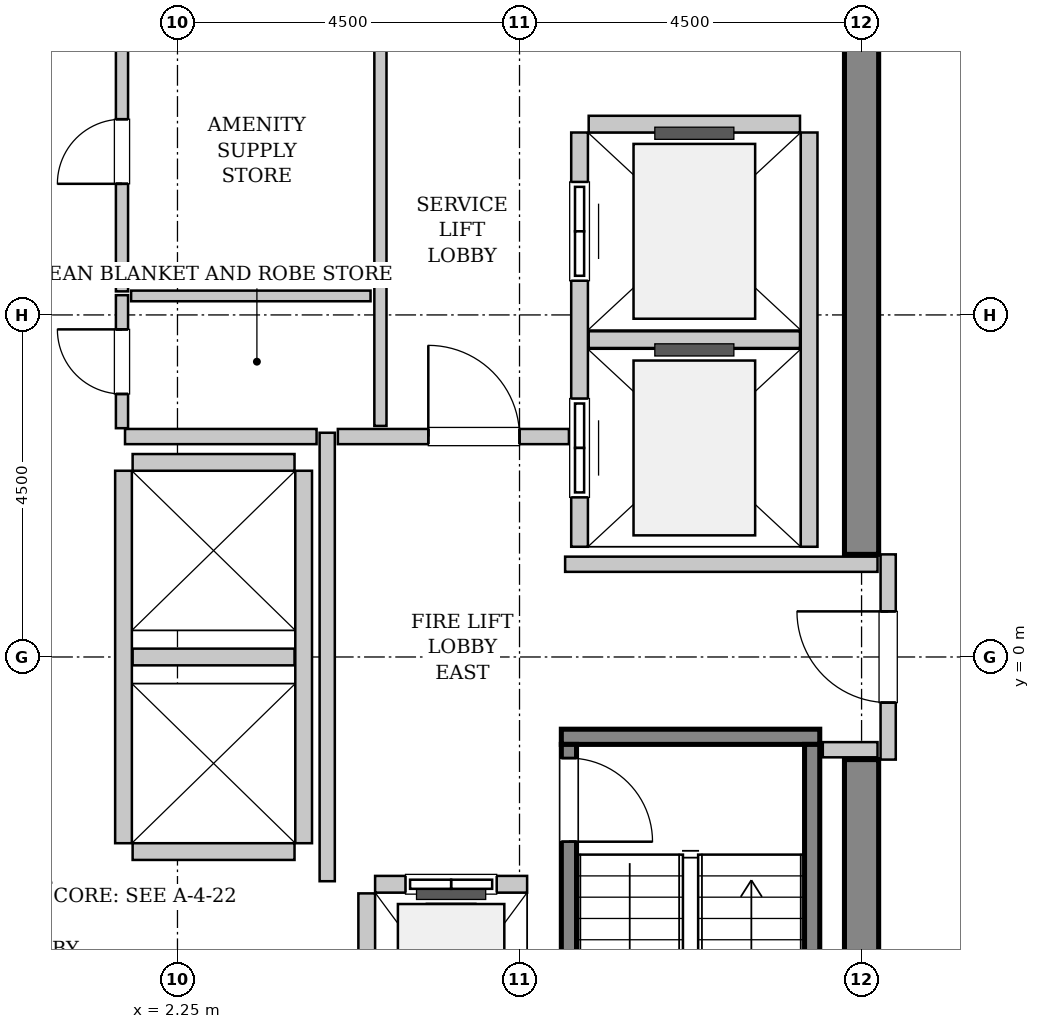
"""IFC4 building model, lengths in metres.
Left out: names, types, materials, properties, quantities, classifications, styles, units other than length and angle.
Written with IfcOpenShell. Run it as: python <this file> out.ifc"""

import sys

from ifc_helpers import new_model, si_unit, direction, frame, frame_2d, origin, place, context, subcontext, project, spatial, rectangle, extrude, source, transform, mapped, element, fill, save


model = new_model("IFC4")
c1 = context("Model", 3, precision=1e-05, world=origin(), true_north=direction((0.0, 1.0)))
c2 = subcontext(c1, "Body", "Model", "MODEL_VIEW")
j1 = project(units=[si_unit("LENGTHUNIT", "METRE"), si_unit("PLANEANGLEUNIT", "RADIAN")], contexts=[c1])
p1 = place(None, origin())
s1 = spatial("IfcSite", under=j1, at=p1, CompositionType="ELEMENT")
p2 = place(p1, origin())
s2 = spatial("IfcBuilding", under=s1, at=p2, CompositionType="ELEMENT")
p3 = place(p2, frame((0.0, 0.0, 268.4)))
s3 = spatial("IfcBuildingStorey", under=s2, at=p3, CompositionType="ELEMENT", Elevation=268.4)
m1 = source(origin(), c2, "Body", "SweptSolid", [
    extrude(rectangle(XDim=7.425, YDim=0.45, at=frame_2d((3.712, 0.0))), origin(), (0.0, 0.0, 1.0), 3.8),
])
for number, where, z_axis, x_axis in (
    (1, (11.25, -8.775, 0.0), (0.0, 0.0, 1.0), (0.0, 1.0, 0.0)),
    (2, (11.25, 1.35, 0.0), (0.0, 0.0, 1.0), (0.0, 1.0, 0.0)),
):
    element("IfcWall", number, at=place(p3, frame(where, z_axis=z_axis, x_axis=x_axis)), inside=s3, PredefinedType="SHEAR", context=c2, shape_type="MappedRepresentation", body=[
        mapped(m1, transform((0.0, 0.0, 0.0), x_axis=(1.0, 0.0, 0.0), y_axis=(0.0, 1.0, 0.0), z_axis=(0.0, 0.0, 1.0), scale=1.0)),
    ])
m2 = source(origin(), c2, "Body", "SweptSolid", [
    extrude(rectangle(XDim=3.4, YDim=0.2, at=frame_2d((1.7, 0.0))), origin(), (0.0, 0.0, 1.0), 3.8),
])
p4 = place(p3, frame((7.3, -1.05, 0.0), z_axis=(0.0, 0.0, 1.0), x_axis=(1.0, 0.0, 0.0)))
e3 = element("IfcWall", 3, at=p4, inside=s3, PredefinedType="SOLIDWALL", context=c2, shape_type="MappedRepresentation", body=[
    mapped(m2, transform((0.0, 0.0, 0.0), x_axis=(1.0, 0.0, 0.0), y_axis=(0.0, 1.0, 0.0), z_axis=(0.0, 0.0, 1.0), scale=1.0)),
])
m3 = source(origin(), c2, "Body", "SweptSolid", [
    extrude(rectangle(XDim=7.1, YDim=0.2, at=frame_2d((3.55, 0.0))), origin(), (0.0, 0.0, 1.0), 3.8),
])
p5 = place(p3, frame((7.4, -1.15, 0.0), z_axis=(0.0, 0.0, 1.0), x_axis=(0.0, -1.0, 0.0)))
e4 = element("IfcWall", 4, at=p5, inside=s3, PredefinedType="SOLIDWALL", context=c2, shape_type="MappedRepresentation", body=[
    mapped(m3, transform((0.0, 0.0, 0.0), x_axis=(1.0, 0.0, 0.0), y_axis=(0.0, 1.0, 0.0), z_axis=(0.0, 0.0, 1.0), scale=1.0)),
])
p6 = place(p5, frame((0.18, 0.0, 0.0)))
e5 = element("IfcOpeningElement", 5, at=p6, cuts=e4, PredefinedType="OPENING", context=c2, shape_type="SweptSolid", body=[
    extrude(rectangle(XDim=1.1, YDim=2.15, at=frame_2d((0.55, 1.075))), frame((0.0, 0.11, 0.0), z_axis=(0.0, -1.0, 0.0), x_axis=(1.0, 0.0, 0.0)), (0.0, 0.0, 1.0), 0.22),
])
p7 = place(p3, frame((10.6, -1.15, 0.0), z_axis=(0.0, 0.0, 1.0), x_axis=(0.0, -1.0, 0.0)))
e6 = element("IfcWall", 6, at=p7, inside=s3, PredefinedType="SOLIDWALL", context=c2, shape_type="MappedRepresentation", body=[
    mapped(m3, transform((0.0, 0.0, 0.0), x_axis=(1.0, 0.0, 0.0), y_axis=(0.0, 1.0, 0.0), z_axis=(0.0, 0.0, 1.0), scale=1.0)),
])
m4 = source(origin(), c2, "Body", "SweptSolid", [
    extrude(rectangle(XDim=2.0, YDim=0.22, at=frame_2d((1.0, 0.0))), origin(), (0.0, 0.0, 1.0), 3.535),
])
p8 = place(p3, frame((6.85, -2.99, 0.0), z_axis=(0.0, 0.0, 1.0), x_axis=(-1.0, 0.0, 0.0)))
e7 = element("IfcWall", 7, at=p8, inside=s3, PredefinedType="SOLIDWALL", context=c2, shape_type="MappedRepresentation", body=[
    mapped(m4, transform((0.0, 0.0, 0.0), x_axis=(1.0, 0.0, 0.0), y_axis=(0.0, 1.0, 0.0), z_axis=(0.0, 0.0, 1.0), scale=1.0)),
])
p9 = place(p8, frame((0.4, 0.0, 0.0)))
e8 = element("IfcOpeningElement", 8, at=p9, cuts=e7, PredefinedType="OPENING", context=c2, shape_type="SweptSolid", body=[
    extrude(rectangle(XDim=1.2, YDim=2.2, at=frame_2d((0.6, 1.1))), frame((0.0, 0.12, 0.0), z_axis=(0.0, -1.0, 0.0), x_axis=(1.0, 0.0, 0.0)), (0.0, 0.0, 1.0), 0.24),
])
m5 = source(origin(), c2, "Body", "SweptSolid", [
    extrude(rectangle(XDim=2.68, YDim=0.22, at=frame_2d((1.34, 0.0))), origin(), (0.0, 0.0, 1.0), 3.535),
])
p10 = place(p3, frame((4.74, -3.11, 0.0), z_axis=(0.0, 0.0, 1.0), x_axis=(0.0, -1.0, 0.0)))
e9 = element("IfcWall", 9, at=p10, inside=s3, PredefinedType="SOLIDWALL", context=c2, shape_type="MappedRepresentation", body=[
    mapped(m5, transform((0.0, 0.0, 0.0), x_axis=(1.0, 0.0, 0.0), y_axis=(0.0, 1.0, 0.0), z_axis=(0.0, 0.0, 1.0), scale=1.0)),
])
m6 = source(origin(), c2, "Body", "SweptSolid", [
    extrude(rectangle(XDim=5.45, YDim=0.22, at=frame_2d((2.725, 0.0))), origin(), (0.0, 0.0, 1.0), 3.535),
])
p11 = place(p3, frame((7.54, 6.9, 0.0), z_axis=(0.0, 0.0, 1.0), x_axis=(0.0, -1.0, 0.0)))
e10 = element("IfcWall", 10, at=p11, inside=s3, PredefinedType="SOLIDWALL", context=c2, shape_type="MappedRepresentation", body=[
    mapped(m6, transform((0.0, 0.0, 0.0), x_axis=(1.0, 0.0, 0.0), y_axis=(0.0, 1.0, 0.0), z_axis=(0.0, 0.0, 1.0), scale=1.0)),
])
p12 = place(p11, frame((3.5, 0.0, 0.0)))
e11 = element("IfcOpeningElement", 11, at=p12, cuts=e10, PredefinedType="OPENING", context=c2, shape_type="SweptSolid", body=[
    extrude(rectangle(XDim=1.3, YDim=2.3, at=frame_2d((0.65, 1.15))), frame((0.0, 0.12, 0.0), z_axis=(0.0, -1.0, 0.0), x_axis=(1.0, 0.0, 0.0)), (0.0, 0.0, 1.0), 0.24),
])
p13 = place(p11, frame((0.65, 0.0, 0.0)))
e12 = element("IfcOpeningElement", 12, at=p13, cuts=e10, PredefinedType="OPENING", context=c2, shape_type="SweptSolid", body=[
    extrude(rectangle(XDim=1.3, YDim=2.3, at=frame_2d((0.65, 1.15))), frame((0.0, 0.12, 0.0), z_axis=(0.0, -1.0, 0.0), x_axis=(1.0, 0.0, 0.0)), (0.0, 0.0, 1.0), 0.24),
])
p14 = place(p3, frame((10.56, 1.45, 0.0), z_axis=(0.0, 0.0, 1.0), x_axis=(0.0, 1.0, 0.0)))
e13 = element("IfcWall", 13, at=p14, inside=s3, PredefinedType="SOLIDWALL", context=c2, shape_type="MappedRepresentation", body=[
    mapped(m6, transform((0.0, 0.0, 0.0), x_axis=(1.0, 0.0, 0.0), y_axis=(0.0, 1.0, 0.0), z_axis=(0.0, 0.0, 1.0), scale=1.0)),
])
m7 = source(origin(), c2, "Body", "SweptSolid", [
    extrude(rectangle(XDim=2.78, YDim=0.22, at=frame_2d((1.39, 0.0))), origin(), (0.0, 0.0, 1.0), 3.535),
])
for number, where, z_axis, x_axis in (
    (14, (7.66, 4.175, 0.0), (0.0, 0.0, 1.0), (1.0, 0.0, 0.0)),
    (15, (10.44, 7.01, 0.0), (0.0, 0.0, 1.0), (-1.0, 0.0, 0.0)),
):
    element("IfcWall", number, at=place(p3, frame(where, z_axis=z_axis, x_axis=x_axis)), inside=s3, PredefinedType="SOLIDWALL", context=c2, shape_type="MappedRepresentation", body=[
        mapped(m7, transform((0.0, 0.0, 0.0), x_axis=(1.0, 0.0, 0.0), y_axis=(0.0, 1.0, 0.0), z_axis=(0.0, 0.0, 1.0), scale=1.0)),
    ])
m8 = source(origin(), c2, "Body", "SweptSolid", [
    extrude(rectangle(XDim=4.9, YDim=0.22, at=frame_2d((2.45, 0.0))), origin(), (0.0, 0.0, 1.0), 3.535),
])
for number, where, z_axis, x_axis in (
    (16, (1.54, 2.45, 0.0), (0.0, 0.0, 1.0), (0.0, -1.0, 0.0)),
    (17, (3.91, -2.45, 0.0), (0.0, 0.0, 1.0), (0.0, 1.0, 0.0)),
):
    element("IfcWall", number, at=place(p3, frame(where, z_axis=z_axis, x_axis=x_axis)), inside=s3, PredefinedType="SOLIDWALL", context=c2, shape_type="MappedRepresentation", body=[
        mapped(m8, transform((0.0, 0.0, 0.0), x_axis=(1.0, 0.0, 0.0), y_axis=(0.0, 1.0, 0.0), z_axis=(0.0, 0.0, 1.0), scale=1.0)),
    ])
m9 = source(origin(), c2, "Body", "SweptSolid", [
    extrude(rectangle(XDim=2.13, YDim=0.22, at=frame_2d((1.065, 0.0))), origin(), (0.0, 0.0, 1.0), 3.535),
])
for number, where, z_axis, x_axis in (
    (18, (1.66, -2.56, 0.0), (0.0, 0.0, 1.0), (1.0, 0.0, 0.0)),
    (19, (1.66, 0.0, 0.0), (0.0, 0.0, 1.0), (1.0, 0.0, 0.0)),
    (20, (3.79, 2.56, 0.0), (0.0, 0.0, 1.0), (-1.0, 0.0, 0.0)),
):
    element("IfcWall", number, at=place(p3, frame(where, z_axis=z_axis, x_axis=x_axis)), inside=s3, PredefinedType="SOLIDWALL", context=c2, shape_type="MappedRepresentation", body=[
        mapped(m9, transform((0.0, 0.0, 0.0), x_axis=(1.0, 0.0, 0.0), y_axis=(0.0, 1.0, 0.0), z_axis=(0.0, 0.0, 1.0), scale=1.0)),
    ])
m10 = source(origin(), c2, "Body", "SweptSolid", [
    extrude(rectangle(XDim=2.7, YDim=0.2, at=frame_2d((1.35, 0.0))), origin(), (0.0, 0.0, 1.0), 2.625),
])
p15 = place(p3, frame((11.6, -1.35, 0.0), z_axis=(0.0, 0.0, 1.0), x_axis=(0.0, 1.0, 0.0)))
e21 = element("IfcWall", 21, at=p15, inside=s3, PredefinedType="PARTITIONING", context=c2, shape_type="MappedRepresentation", body=[
    mapped(m10, transform((0.0, 0.0, 0.0), x_axis=(1.0, 0.0, 0.0), y_axis=(0.0, 1.0, 0.0), z_axis=(0.0, 0.0, 1.0), scale=1.0)),
])
p16 = place(p15, frame((0.75, 0.0, 0.0)))
e22 = element("IfcOpeningElement", 22, at=p16, cuts=e21, PredefinedType="OPENING", context=c2, shape_type="SweptSolid", body=[
    extrude(rectangle(XDim=1.2, YDim=2.15, at=frame_2d((0.6, 1.075))), frame((0.0, 0.11, 0.0), z_axis=(0.0, -1.0, 0.0), x_axis=(1.0, 0.0, 0.0)), (0.0, 0.0, 1.0), 0.22),
])
m11 = source(origin(), c2, "Body", "SweptSolid", [
    extrude(rectangle(XDim=5.9, YDim=0.2, at=frame_2d((2.95, 0.0))), origin(), (0.0, 0.0, 1.0), 3.535),
])
p17 = place(p3, frame((4.22, -2.95, 0.0), z_axis=(0.0, 0.0, 1.0), x_axis=(0.0, 1.0, 0.0)))
e23 = element("IfcWall", 23, at=p17, inside=s3, PredefinedType="PARTITIONING", context=c2, shape_type="MappedRepresentation", body=[
    mapped(m11, transform((0.0, 0.0, 0.0), x_axis=(1.0, 0.0, 0.0), y_axis=(0.0, 1.0, 0.0), z_axis=(0.0, 0.0, 1.0), scale=1.0)),
])
m12 = source(origin(), c2, "Body", "SweptSolid", [
    extrude(rectangle(XDim=2.52, YDim=0.2, at=frame_2d((1.26, 0.0))), origin(), (0.0, 0.0, 1.0), 3.535),
])
p18 = place(p3, frame((1.56, 2.9, 0.0), z_axis=(0.0, 0.0, 1.0), x_axis=(1.0, 0.0, 0.0)))
e24 = element("IfcWall", 24, at=p18, inside=s3, PredefinedType="PARTITIONING", context=c2, shape_type="MappedRepresentation", body=[
    mapped(m12, transform((0.0, 0.0, 0.0), x_axis=(1.0, 0.0, 0.0), y_axis=(0.0, 1.0, 0.0), z_axis=(0.0, 0.0, 1.0), scale=1.0)),
])
m13 = source(origin(), c2, "Body", "SweptSolid", [
    extrude(rectangle(XDim=3.04, YDim=0.2, at=frame_2d((1.52, 0.0))), origin(), (0.0, 0.0, 1.0), 3.535),
])
p19 = place(p3, frame((4.36, 2.9, 0.0), z_axis=(0.0, 0.0, 1.0), x_axis=(1.0, 0.0, 0.0)))
e25 = element("IfcWall", 25, at=p19, inside=s3, PredefinedType="PARTITIONING", context=c2, shape_type="MappedRepresentation", body=[
    mapped(m13, transform((0.0, 0.0, 0.0), x_axis=(1.0, 0.0, 0.0), y_axis=(0.0, 1.0, 0.0), z_axis=(0.0, 0.0, 1.0), scale=1.0)),
])
p20 = place(p19, frame((1.19, 0.0, 0.0)))
e26 = element("IfcOpeningElement", 26, at=p20, cuts=e25, PredefinedType="OPENING", context=c2, shape_type="SweptSolid", body=[
    extrude(rectangle(XDim=1.2, YDim=2.15, at=frame_2d((0.6, 1.075))), frame((0.0, 0.11, 0.0), z_axis=(0.0, -1.0, 0.0), x_axis=(1.0, 0.0, 0.0)), (0.0, 0.0, 1.0), 0.22),
])
m14 = source(origin(), c2, "Body", "SweptSolid", [
    extrude(rectangle(XDim=4.11, YDim=0.2, at=frame_2d((2.055, 0.0))), origin(), (0.0, 0.0, 1.0), 3.535),
])
p21 = place(p3, frame((7.35, 1.22, 0.0), z_axis=(0.0, 0.0, 1.0), x_axis=(1.0, 0.0, 0.0)))
e27 = element("IfcWall", 27, at=p21, inside=s3, PredefinedType="PARTITIONING", context=c2, shape_type="MappedRepresentation", body=[
    mapped(m14, transform((0.0, 0.0, 0.0), x_axis=(1.0, 0.0, 0.0), y_axis=(0.0, 1.0, 0.0), z_axis=(0.0, 0.0, 1.0), scale=1.0)),
])
m15 = source(origin(), c2, "Body", "SweptSolid", [
    extrude(rectangle(XDim=0.72, YDim=0.2, at=frame_2d((0.36, 0.0))), origin(), (0.0, 0.0, 1.0), 3.535),
])
p22 = place(p3, frame((10.74, -1.22, 0.0), z_axis=(0.0, 0.0, 1.0), x_axis=(1.0, 0.0, 0.0)))
e28 = element("IfcWall", 28, at=p22, inside=s3, PredefinedType="PARTITIONING", context=c2, shape_type="MappedRepresentation", body=[
    mapped(m15, transform((0.0, 0.0, 0.0), x_axis=(1.0, 0.0, 0.0), y_axis=(0.0, 1.0, 0.0), z_axis=(0.0, 0.0, 1.0), scale=1.0)),
])
m16 = source(origin(), c2, "Body", "SweptSolid", [
    extrude(rectangle(XDim=5.45, YDim=0.16, at=frame_2d((2.725, 0.0))), origin(), (0.0, 0.0, 1.0), 3.535),
])
p23 = place(p3, frame((4.92, 3.04, 0.0), z_axis=(0.0, 0.0, 1.0), x_axis=(0.0, 1.0, 0.0)))
e29 = element("IfcWall", 29, at=p23, inside=s3, PredefinedType="PARTITIONING", context=c2, shape_type="MappedRepresentation", body=[
    mapped(m16, transform((0.0, 0.0, 0.0), x_axis=(1.0, 0.0, 0.0), y_axis=(0.0, 1.0, 0.0), z_axis=(0.0, 0.0, 1.0), scale=1.0)),
])
m17 = source(origin(), c2, "Body", "SweptSolid", [
    extrude(rectangle(XDim=1.75, YDim=0.16, at=frame_2d((0.875, 0.0))), origin(), (0.0, 0.0, 1.0), 3.535),
])
p24 = place(p3, frame((1.52, 3.01, 0.0), z_axis=(0.0, 0.0, 1.0), x_axis=(0.0, 1.0, 0.0)))
e30 = element("IfcWall", 30, at=p24, inside=s3, PredefinedType="PARTITIONING", context=c2, shape_type="MappedRepresentation", body=[
    mapped(m17, transform((0.0, 0.0, 0.0), x_axis=(1.0, 0.0, 0.0), y_axis=(0.0, 1.0, 0.0), z_axis=(0.0, 0.0, 1.0), scale=1.0)),
])
p25 = place(p24, frame((0.45, 0.0, 0.0)))
e31 = element("IfcOpeningElement", 31, at=p25, cuts=e30, PredefinedType="OPENING", context=c2, shape_type="SweptSolid", body=[
    extrude(rectangle(XDim=0.85, YDim=2.1, at=frame_2d((0.425, 1.05))), frame((0.0, 0.09, 0.0), z_axis=(0.0, -1.0, 0.0), x_axis=(1.0, 0.0, 0.0)), (0.0, 0.0, 1.0), 0.18),
])
m18 = source(origin(), c2, "Body", "SweptSolid", [
    extrude(rectangle(XDim=3.15, YDim=0.14, at=frame_2d((1.575, 0.0))), origin(), (0.0, 0.0, 1.0), 3.535),
])
p26 = place(p3, frame((1.64, 4.75, 0.0), z_axis=(0.0, 0.0, 1.0), x_axis=(1.0, 0.0, 0.0)))
e32 = element("IfcWall", 32, at=p26, inside=s3, PredefinedType="PARTITIONING", context=c2, shape_type="MappedRepresentation", body=[
    mapped(m18, transform((0.0, 0.0, 0.0), x_axis=(1.0, 0.0, 0.0), y_axis=(0.0, 1.0, 0.0), z_axis=(0.0, 0.0, 1.0), scale=1.0)),
])
m19 = source(origin(), c2, "Body", "SweptSolid", [
    extrude(rectangle(XDim=3.68, YDim=0.16, at=frame_2d((1.84, 0.0))), origin(), (0.0, 0.0, 1.0), 3.535),
])
p27 = place(p3, frame((1.52, 4.81, 0.0), z_axis=(0.0, 0.0, 1.0), x_axis=(0.0, 1.0, 0.0)))
e33 = element("IfcWall", 33, at=p27, inside=s3, PredefinedType="PARTITIONING", context=c2, shape_type="MappedRepresentation", body=[
    mapped(m19, transform((0.0, 0.0, 0.0), x_axis=(1.0, 0.0, 0.0), y_axis=(0.0, 1.0, 0.0), z_axis=(0.0, 0.0, 1.0), scale=1.0)),
])
p28 = place(p27, frame((1.415, 0.0, 0.0)))
e34 = element("IfcOpeningElement", 34, at=p28, cuts=e33, PredefinedType="OPENING", context=c2, shape_type="SweptSolid", body=[
    extrude(rectangle(XDim=0.85, YDim=2.1, at=frame_2d((0.425, 1.05))), frame((0.0, 0.09, 0.0), z_axis=(0.0, -1.0, 0.0), x_axis=(1.0, 0.0, 0.0)), (0.0, 0.0, 1.0), 0.18),
])
m20 = source(origin(), c2, "Body", "SweptSolid", [
    extrude(rectangle(XDim=1.1, YDim=2.15, at=frame_2d((0.55, 1.075))), frame((0.0, 0.025, 0.0), z_axis=(0.0, -1.0, 0.0), x_axis=(1.0, 0.0, 0.0)), (0.0, 0.0, 1.0), 0.05),
])
p29 = place(p6, origin())
e35 = element("IfcDoor", 35, at=p29, inside=s3, OperationType="SINGLE_SWING_RIGHT", PredefinedType="DOOR", context=c2, shape_type="MappedRepresentation", body=[
    mapped(m20, transform((0.0, 0.0, 0.0), x_axis=(1.0, 0.0, 0.0), y_axis=(0.0, 1.0, 0.0), z_axis=(0.0, 0.0, 1.0), scale=1.0)),
])
fill(e5, e35)
m21 = source(origin(), c2, "Body", "SweptSolid", [
    extrude(rectangle(XDim=1.2, YDim=2.2, at=frame_2d((0.6, 1.1))), frame((0.0, 0.025, 0.0), z_axis=(0.0, -1.0, 0.0), x_axis=(1.0, 0.0, 0.0)), (0.0, 0.0, 1.0), 0.05),
])
p30 = place(p9, origin())
e36 = element("IfcDoor", 36, at=p30, inside=s3, OperationType="SLIDING_TO_LEFT", PredefinedType="DOOR", context=c2, shape_type="MappedRepresentation", body=[
    mapped(m21, transform((0.0, 0.0, 0.0), x_axis=(1.0, 0.0, 0.0), y_axis=(0.0, 1.0, 0.0), z_axis=(0.0, 0.0, 1.0), scale=1.0)),
])
fill(e8, e36)
m22 = source(origin(), c2, "Body", "SweptSolid", [
    extrude(rectangle(XDim=1.3, YDim=2.3, at=frame_2d((0.65, 1.15))), frame((0.0, 0.025, 0.0), z_axis=(0.0, -1.0, 0.0), x_axis=(1.0, 0.0, 0.0)), (0.0, 0.0, 1.0), 0.05),
])
p31 = place(p12, origin())
e37 = element("IfcDoor", 37, at=p31, inside=s3, OperationType="SLIDING_TO_RIGHT", PredefinedType="DOOR", context=c2, shape_type="MappedRepresentation", body=[
    mapped(m22, transform((0.0, 0.0, 0.0), x_axis=(1.0, 0.0, 0.0), y_axis=(0.0, 1.0, 0.0), z_axis=(0.0, 0.0, 1.0), scale=1.0)),
])
fill(e11, e37)
p32 = place(p13, origin())
e38 = element("IfcDoor", 38, at=p32, inside=s3, OperationType="SLIDING_TO_RIGHT", PredefinedType="DOOR", context=c2, shape_type="MappedRepresentation", body=[
    mapped(m22, transform((0.0, 0.0, 0.0), x_axis=(1.0, 0.0, 0.0), y_axis=(0.0, 1.0, 0.0), z_axis=(0.0, 0.0, 1.0), scale=1.0)),
])
fill(e12, e38)
m23 = source(origin(), c2, "Body", "SweptSolid", [
    extrude(rectangle(XDim=1.2, YDim=2.15, at=frame_2d((0.6, 1.075))), frame((0.0, 0.025, 0.0), z_axis=(0.0, -1.0, 0.0), x_axis=(1.0, 0.0, 0.0)), (0.0, 0.0, 1.0), 0.05),
])
p33 = place(p16, origin())
e39 = element("IfcDoor", 39, at=p33, inside=s3, OperationType="SINGLE_SWING_RIGHT", PredefinedType="DOOR", context=c2, shape_type="MappedRepresentation", body=[
    mapped(m23, transform((0.0, 0.0, 0.0), x_axis=(1.0, 0.0, 0.0), y_axis=(0.0, 1.0, 0.0), z_axis=(0.0, 0.0, 1.0), scale=1.0)),
])
fill(e22, e39)
p34 = place(p20, origin())
e40 = element("IfcDoor", 40, at=p34, inside=s3, OperationType="SINGLE_SWING_LEFT", PredefinedType="DOOR", context=c2, shape_type="MappedRepresentation", body=[
    mapped(m23, transform((0.0, 0.0, 0.0), x_axis=(1.0, 0.0, 0.0), y_axis=(0.0, 1.0, 0.0), z_axis=(0.0, 0.0, 1.0), scale=1.0)),
])
fill(e26, e40)
m24 = source(origin(), c2, "Body", "SweptSolid", [
    extrude(rectangle(XDim=0.85, YDim=2.1, at=frame_2d((0.425, 1.05))), frame((0.0, 0.025, 0.0), z_axis=(0.0, -1.0, 0.0), x_axis=(1.0, 0.0, 0.0)), (0.0, 0.0, 1.0), 0.05),
])
p35 = place(p25, origin())
e41 = element("IfcDoor", 41, at=p35, inside=s3, OperationType="SINGLE_SWING_RIGHT", PredefinedType="DOOR", context=c2, shape_type="MappedRepresentation", body=[
    mapped(m24, transform((0.0, 0.0, 0.0), x_axis=(1.0, 0.0, 0.0), y_axis=(0.0, 1.0, 0.0), z_axis=(0.0, 0.0, 1.0), scale=1.0)),
])
fill(e31, e41)
p36 = place(p28, origin())
e42 = element("IfcDoor", 42, at=p36, inside=s3, OperationType="SINGLE_SWING_LEFT", PredefinedType="DOOR", context=c2, shape_type="MappedRepresentation", body=[
    mapped(m24, transform((0.0, 0.0, 0.0), x_axis=(1.0, 0.0, 0.0), y_axis=(0.0, 1.0, 0.0), z_axis=(0.0, 0.0, 1.0), scale=1.0)),
])
fill(e34, e42)
save(model, sys.argv[1])
